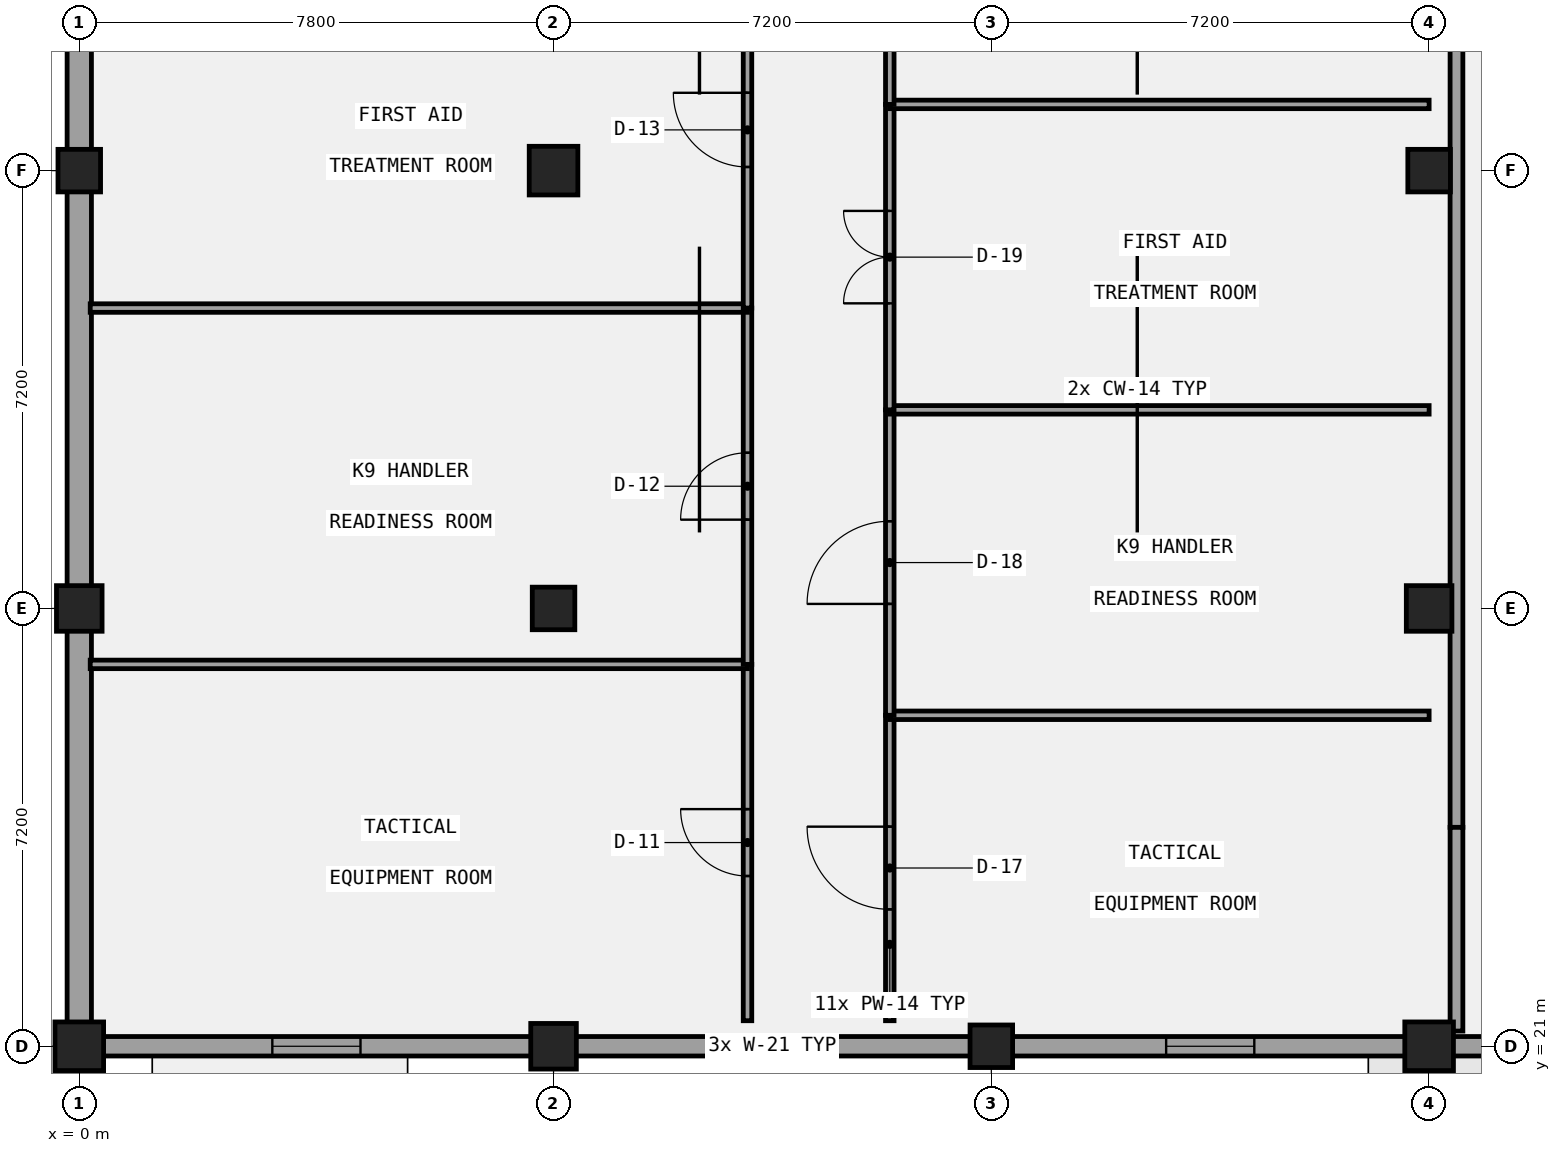
"""IFC4 building model, lengths in metres.
Left out: names, types, materials, properties, quantities, classifications, styles, units other than length and angle.
Written with IfcOpenShell. Run it as: python <this file> out.ifc"""

import sys

from ifc_helpers import new_model, si_unit, direction, frame, frame_2d, origin, origin_2d, place, context, subcontext, project, spatial, rectangle, extrude, element, fill, save


model = new_model("IFC4")
c1 = context("Model", 3, precision=1e-05, world=origin(), true_north=direction((0.0, 1.0)))
c2 = subcontext(c1, "Body", "Model", "MODEL_VIEW")
j1 = project(units=[si_unit("LENGTHUNIT", "METRE"), si_unit("PLANEANGLEUNIT", "RADIAN")], contexts=[c1])
p1 = place(None, origin())
s1 = spatial("IfcSite", under=j1, at=p1, CompositionType="ELEMENT")
p2 = place(p1, origin())
s2 = spatial("IfcBuilding", under=s1, at=p2, CompositionType="ELEMENT")
p3 = place(p2, origin())
s3 = spatial("IfcBuildingStorey", under=s2, at=p3, CompositionType="ELEMENT", Elevation=0.0)
p4 = place(p3, frame((0.0, 21.0, -0.32), z_axis=(0.0, 0.0, 1.0), x_axis=(1.0, 0.0, 0.0)))
e1 = element("IfcColumn", 1, at=p4, inside=s3, PredefinedType="COLUMN", context=c2, shape_type="SweptSolid", body=[
    extrude(rectangle(XDim=0.8, YDim=0.8, at=origin_2d()), origin(), (0.0, 0.0, 1.0), 5.72),
])
p5 = place(p3, frame((0.0, 28.2, -0.32), z_axis=(0.0, 0.0, 1.0), x_axis=(1.0, 0.0, 0.0)))
e2 = element("IfcColumn", 2, at=p5, inside=s3, PredefinedType="COLUMN", context=c2, shape_type="SweptSolid", body=[
    extrude(rectangle(XDim=0.75, YDim=0.75, at=origin_2d()), origin(), (0.0, 0.0, 1.0), 5.72),
])
p6 = place(p3, frame((0.0, 35.4, -0.32), z_axis=(0.0, 0.0, 1.0), x_axis=(1.0, 0.0, 0.0)))
e3 = element("IfcColumn", 3, at=p6, inside=s3, PredefinedType="COLUMN", context=c2, shape_type="SweptSolid", body=[
    extrude(rectangle(XDim=0.7, YDim=0.7, at=origin_2d()), origin(), (0.0, 0.0, 1.0), 5.72),
])
p7 = place(p3, frame((7.8, 21.0, 0.0), z_axis=(0.0, 0.0, 1.0), x_axis=(1.0, 0.0, 0.0)))
e4 = element("IfcColumn", 4, at=p7, inside=s3, PredefinedType="COLUMN", context=c2, shape_type="SweptSolid", body=[
    extrude(rectangle(XDim=0.75, YDim=0.75, at=origin_2d()), origin(), (0.0, 0.0, 1.0), 5.4),
])
p8 = place(p3, frame((7.8, 28.2, 0.0), z_axis=(0.0, 0.0, 1.0), x_axis=(1.0, 0.0, 0.0)))
e5 = element("IfcColumn", 5, at=p8, inside=s3, PredefinedType="COLUMN", context=c2, shape_type="SweptSolid", body=[
    extrude(rectangle(XDim=0.7, YDim=0.7, at=origin_2d()), origin(), (0.0, 0.0, 1.0), 5.4),
])
p9 = place(p3, frame((7.8, 35.4, 0.0), z_axis=(0.0, 0.0, 1.0), x_axis=(1.0, 0.0, 0.0)))
e6 = element("IfcColumn", 6, at=p9, inside=s3, PredefinedType="COLUMN", context=c2, shape_type="SweptSolid", body=[
    extrude(rectangle(XDim=0.8, YDim=0.8, at=origin_2d()), origin(), (0.0, 0.0, 1.0), 5.4),
])
p10 = place(p3, frame((15.0, 21.0, 0.0), z_axis=(0.0, 0.0, 1.0), x_axis=(1.0, 0.0, 0.0)))
e7 = element("IfcColumn", 7, at=p10, inside=s3, PredefinedType="COLUMN", context=c2, shape_type="SweptSolid", body=[
    extrude(rectangle(XDim=0.7, YDim=0.7, at=origin_2d()), origin(), (0.0, 0.0, 1.0), 5.4),
])
p11 = place(p3, frame((22.2, 21.0, 0.0), z_axis=(0.0, 0.0, 1.0), x_axis=(1.0, 0.0, 0.0)))
e8 = element("IfcColumn", 8, at=p11, inside=s3, PredefinedType="COLUMN", context=c2, shape_type="SweptSolid", body=[
    extrude(rectangle(XDim=0.8, YDim=0.8, at=origin_2d()), origin(), (0.0, 0.0, 1.0), 5.4),
])
p12 = place(p3, frame((22.2, 28.2, 0.0), z_axis=(0.0, 0.0, 1.0), x_axis=(1.0, 0.0, 0.0)))
e9 = element("IfcColumn", 9, at=p12, inside=s3, PredefinedType="COLUMN", context=c2, shape_type="SweptSolid", body=[
    extrude(rectangle(XDim=0.75, YDim=0.75, at=origin_2d()), origin(), (0.0, 0.0, 1.0), 5.4),
])
p13 = place(p3, frame((22.2, 35.4, 0.0), z_axis=(0.0, 0.0, 1.0), x_axis=(1.0, 0.0, 0.0)))
e10 = element("IfcColumn", 10, at=p13, inside=s3, PredefinedType="COLUMN", context=c2, shape_type="SweptSolid", body=[
    extrude(rectangle(XDim=0.7, YDim=0.7, at=origin_2d()), origin(), (0.0, 0.0, 1.0), 5.4),
])
p14 = place(p3, frame((0.0, 56.8, 0.0), z_axis=(0.0, 0.0, 1.0), x_axis=(0.0, -1.0, 0.0)))
e11 = element("IfcWall", 11, at=p14, inside=s3, PredefinedType="SOLIDWALL", context=c2, shape_type="SweptSolid", body=[
    extrude(rectangle(XDim=35.6, YDim=0.4, at=frame_2d((17.8, 0.0))), origin(), (0.0, 0.0, 1.0), 4.37),
])
p15 = place(p3, frame((-0.16, 21.0, 0.0), z_axis=(0.0, 0.0, 1.0), x_axis=(1.0, 0.0, 0.0)))
e12 = element("IfcWall", 12, at=p15, inside=s3, PredefinedType="SOLIDWALL", context=c2, shape_type="SweptSolid", body=[
    extrude(rectangle(XDim=29.72, YDim=0.32, at=frame_2d((14.86, 0.0))), origin(), (0.0, 0.0, 1.0), 3.35),
])
p16 = place(p15, frame((23.56, 0.0, 0.0)))
e13 = element("IfcOpeningElement", 13, at=p16, cuts=e12, PredefinedType="OPENING", context=c2, shape_type="SweptSolid", body=[
    extrude(rectangle(XDim=4.8, YDim=3.1, at=frame_2d((2.4, 1.55))), frame((0.0, 0.17, 0.0), z_axis=(0.0, -1.0, 0.0), x_axis=(1.0, 0.0, 0.0)), (0.0, 0.0, 1.0), 0.34),
])
p17 = place(p15, frame((3.335, 0.0, 1.0)))
e14 = element("IfcOpeningElement", 14, at=p17, cuts=e12, PredefinedType="OPENING", context=c2, shape_type="SweptSolid", body=[
    extrude(rectangle(XDim=1.45, YDim=1.4, at=frame_2d((0.725, 0.7))), frame((0.0, 0.17, 0.0), z_axis=(0.0, -1.0, 0.0), x_axis=(1.0, 0.0, 0.0)), (0.0, 0.0, 1.0), 0.34),
])
p18 = place(p15, frame((10.835, 0.0, 1.0)))
e15 = element("IfcOpeningElement", 15, at=p18, cuts=e12, PredefinedType="OPENING", context=c2, shape_type="SweptSolid", body=[
    extrude(rectangle(XDim=1.45, YDim=1.4, at=frame_2d((0.725, 0.7))), frame((0.0, 0.17, 0.0), z_axis=(0.0, -1.0, 0.0), x_axis=(1.0, 0.0, 0.0)), (0.0, 0.0, 1.0), 0.34),
])
p19 = place(p15, frame((18.035, 0.0, 1.0)))
e16 = element("IfcOpeningElement", 16, at=p19, cuts=e12, PredefinedType="OPENING", context=c2, shape_type="SweptSolid", body=[
    extrude(rectangle(XDim=1.45, YDim=1.4, at=frame_2d((0.725, 0.7))), frame((0.0, 0.17, 0.0), z_axis=(0.0, -1.0, 0.0), x_axis=(1.0, 0.0, 0.0)), (0.0, 0.0, 1.0), 0.34),
])
p20 = place(p3, frame((22.65, 24.6, 0.0), z_axis=(0.0, 0.0, 1.0), x_axis=(0.0, 1.0, 0.0)))
e17 = element("IfcWall", 17, at=p20, inside=s3, PredefinedType="PARTITIONING", context=c2, shape_type="SweptSolid", body=[
    extrude(rectangle(XDim=32.0, YDim=0.21, at=frame_2d((16.0, 0.0))), origin(), (0.0, 0.0, 1.0), 4.65),
])
p21 = place(p3, frame((22.65, 21.25, 0.0), z_axis=(0.0, 0.0, 1.0), x_axis=(0.0, 1.0, 0.0)))
e18 = element("IfcWall", 18, at=p21, inside=s3, PredefinedType="PARTITIONING", context=c2, shape_type="SweptSolid", body=[
    extrude(rectangle(XDim=3.35, YDim=0.21, at=frame_2d((1.675, 0.0))), origin(), (0.0, 0.0, 1.0), 4.65),
])
p22 = place(p3, frame((10.99, 21.42, 0.0), z_axis=(0.0, 0.0, 1.0), x_axis=(0.0, 1.0, 0.0)))
e19 = element("IfcWall", 19, at=p22, inside=s3, PredefinedType="PARTITIONING", context=c2, shape_type="SweptSolid", body=[
    extrude(rectangle(XDim=5.86, YDim=0.14, at=frame_2d((2.93, 0.0))), origin(), (0.0, 0.0, 1.0), 5.12),
])
p23 = place(p22, frame((2.38, 0.0, 0.0)))
e20 = element("IfcOpeningElement", 20, at=p23, cuts=e19, PredefinedType="OPENING", context=c2, shape_type="SweptSolid", body=[
    extrude(rectangle(XDim=1.1, YDim=2.22, at=frame_2d((0.55, 1.11))), frame((0.0, 0.08, 0.0), z_axis=(0.0, -1.0, 0.0), x_axis=(1.0, 0.0, 0.0)), (0.0, 0.0, 1.0), 0.16),
])
p24 = place(p3, frame((0.18, 27.28, 0.0), z_axis=(0.0, 0.0, 1.0), x_axis=(1.0, 0.0, 0.0)))
e21 = element("IfcWall", 21, at=p24, inside=s3, PredefinedType="PARTITIONING", context=c2, shape_type="SweptSolid", body=[
    extrude(rectangle(XDim=10.81, YDim=0.14, at=frame_2d((5.405, 0.0))), origin(), (0.0, 0.0, 1.0), 5.12),
])
p25 = place(p3, frame((10.99, 27.28, 0.0), z_axis=(0.0, 0.0, 1.0), x_axis=(0.0, 1.0, 0.0)))
e22 = element("IfcWall", 22, at=p25, inside=s3, PredefinedType="PARTITIONING", context=c2, shape_type="SweptSolid", body=[
    extrude(rectangle(XDim=5.86, YDim=0.14, at=frame_2d((2.93, 0.0))), origin(), (0.0, 0.0, 1.0), 5.12),
])
p26 = place(p25, frame((2.38, 0.0, 0.0)))
e23 = element("IfcOpeningElement", 23, at=p26, cuts=e22, PredefinedType="OPENING", context=c2, shape_type="SweptSolid", body=[
    extrude(rectangle(XDim=1.1, YDim=2.35, at=frame_2d((0.55, 1.175))), frame((0.0, 0.08, 0.0), z_axis=(0.0, -1.0, 0.0), x_axis=(1.0, 0.0, 0.0)), (0.0, 0.0, 1.0), 0.16),
])
p27 = place(p3, frame((0.18, 33.14, 0.0), z_axis=(0.0, 0.0, 1.0), x_axis=(1.0, 0.0, 0.0)))
e24 = element("IfcWall", 24, at=p27, inside=s3, PredefinedType="PARTITIONING", context=c2, shape_type="SweptSolid", body=[
    extrude(rectangle(XDim=10.81, YDim=0.14, at=frame_2d((5.405, 0.0))), origin(), (0.0, 0.0, 1.0), 5.12),
])
p28 = place(p3, frame((10.99, 33.14, 0.0), z_axis=(0.0, 0.0, 1.0), x_axis=(0.0, 1.0, 0.0)))
e25 = element("IfcWall", 25, at=p28, inside=s3, PredefinedType="PARTITIONING", context=c2, shape_type="SweptSolid", body=[
    extrude(rectangle(XDim=5.86, YDim=0.14, at=frame_2d((2.93, 0.0))), origin(), (0.0, 0.0, 1.0), 5.12),
])
p29 = place(p28, frame((2.32, 0.0, 0.0)))
e26 = element("IfcOpeningElement", 26, at=p29, cuts=e25, PredefinedType="OPENING", context=c2, shape_type="SweptSolid", body=[
    extrude(rectangle(XDim=1.22, YDim=2.1, at=frame_2d((0.61, 1.05))), frame((0.0, 0.08, 0.0), z_axis=(0.0, -1.0, 0.0), x_axis=(1.0, 0.0, 0.0)), (0.0, 0.0, 1.0), 0.16),
])
p30 = place(p3, frame((13.33, 21.42, 0.0), z_axis=(0.0, 0.0, 1.0), x_axis=(0.0, 1.0, 0.0)))
e27 = element("IfcWall", 27, at=p30, inside=s3, PredefinedType="PARTITIONING", context=c2, shape_type="SweptSolid", body=[
    extrude(rectangle(XDim=5.023, YDim=0.14, at=frame_2d((2.512, 0.0))), origin(), (0.0, 0.0, 1.0), 5.12),
])
p31 = place(p30, frame((1.832, 0.0, 0.0)))
e28 = element("IfcOpeningElement", 28, at=p31, cuts=e27, PredefinedType="OPENING", context=c2, shape_type="SweptSolid", body=[
    extrude(rectangle(XDim=1.36, YDim=2.22, at=frame_2d((0.68, 1.11))), frame((0.0, 0.08, 0.0), z_axis=(0.0, -1.0, 0.0), x_axis=(1.0, 0.0, 0.0)), (0.0, 0.0, 1.0), 0.16),
])
p32 = place(p3, frame((13.33, 26.443, 0.0), z_axis=(0.0, 0.0, 1.0), x_axis=(1.0, 0.0, 0.0)))
e29 = element("IfcWall", 29, at=p32, inside=s3, PredefinedType="PARTITIONING", context=c2, shape_type="SweptSolid", body=[
    extrude(rectangle(XDim=8.87, YDim=0.14, at=frame_2d((4.435, 0.0))), origin(), (0.0, 0.0, 1.0), 5.12),
])
p33 = place(p3, frame((13.33, 26.443, 0.0), z_axis=(0.0, 0.0, 1.0), x_axis=(0.0, 1.0, 0.0)))
e30 = element("IfcWall", 30, at=p33, inside=s3, PredefinedType="PARTITIONING", context=c2, shape_type="SweptSolid", body=[
    extrude(rectangle(XDim=5.023, YDim=0.14, at=frame_2d((2.511, 0.0))), origin(), (0.0, 0.0, 1.0), 5.12),
])
p34 = place(p33, frame((1.832, 0.0, 0.0)))
e31 = element("IfcOpeningElement", 31, at=p34, cuts=e30, PredefinedType="OPENING", context=c2, shape_type="SweptSolid", body=[
    extrude(rectangle(XDim=1.36, YDim=2.35, at=frame_2d((0.68, 1.175))), frame((0.0, 0.08, 0.0), z_axis=(0.0, -1.0, 0.0), x_axis=(1.0, 0.0, 0.0)), (0.0, 0.0, 1.0), 0.16),
])
p35 = place(p3, frame((13.33, 31.466, 0.0), z_axis=(0.0, 0.0, 1.0), x_axis=(1.0, 0.0, 0.0)))
e32 = element("IfcWall", 32, at=p35, inside=s3, PredefinedType="PARTITIONING", context=c2, shape_type="SweptSolid", body=[
    extrude(rectangle(XDim=8.87, YDim=0.14, at=frame_2d((4.435, 0.0))), origin(), (0.0, 0.0, 1.0), 5.12),
])
p36 = place(p3, frame((13.33, 31.466, 0.0), z_axis=(0.0, 0.0, 1.0), x_axis=(0.0, 1.0, 0.0)))
e33 = element("IfcWall", 33, at=p36, inside=s3, PredefinedType="PARTITIONING", context=c2, shape_type="SweptSolid", body=[
    extrude(rectangle(XDim=5.023, YDim=0.14, at=frame_2d((2.511, 0.0))), origin(), (0.0, 0.0, 1.0), 5.12),
])
p37 = place(p36, frame((1.751, 0.0, 0.0)))
e34 = element("IfcOpeningElement", 34, at=p37, cuts=e33, PredefinedType="OPENING", context=c2, shape_type="SweptSolid", body=[
    extrude(rectangle(XDim=1.52, YDim=2.1, at=frame_2d((0.76, 1.05))), frame((0.0, 0.08, 0.0), z_axis=(0.0, -1.0, 0.0), x_axis=(1.0, 0.0, 0.0)), (0.0, 0.0, 1.0), 0.16),
])
p38 = place(p3, frame((13.33, 36.489, 0.0), z_axis=(0.0, 0.0, 1.0), x_axis=(1.0, 0.0, 0.0)))
e35 = element("IfcWall", 35, at=p38, inside=s3, PredefinedType="PARTITIONING", context=c2, shape_type="SweptSolid", body=[
    extrude(rectangle(XDim=8.87, YDim=0.14, at=frame_2d((4.435, 0.0))), origin(), (0.0, 0.0, 1.0), 5.12),
])
p39 = place(p3, frame((13.33, 36.489, 0.0), z_axis=(0.0, 0.0, 1.0), x_axis=(0.0, 1.0, 0.0)))
e36 = element("IfcWall", 36, at=p39, inside=s3, PredefinedType="PARTITIONING", context=c2, shape_type="SweptSolid", body=[
    extrude(rectangle(XDim=5.022, YDim=0.14, at=frame_2d((2.511, 0.0))), origin(), (0.0, 0.0, 1.0), 5.12),
])
p40 = place(p39, frame((1.751, 0.0, 0.0)))
e37 = element("IfcOpeningElement", 37, at=p40, cuts=e36, PredefinedType="OPENING", context=c2, shape_type="SweptSolid", body=[
    extrude(rectangle(XDim=1.52, YDim=2.22, at=frame_2d((0.76, 1.11))), frame((0.0, 0.08, 0.0), z_axis=(0.0, -1.0, 0.0), x_axis=(1.0, 0.0, 0.0)), (0.0, 0.0, 1.0), 0.16),
])
p41 = place(p17, origin())
e38 = element("IfcWindow", 38, at=p41, inside=s3, PartitioningType="SINGLE_PANEL", PredefinedType="WINDOW", context=c2, shape_type="SweptSolid", body=[
    extrude(rectangle(XDim=1.45, YDim=1.4, at=frame_2d((0.725, 0.7))), frame((0.0, 0.03, 0.0), z_axis=(0.0, -1.0, 0.0), x_axis=(1.0, 0.0, 0.0)), (0.0, 0.0, 1.0), 0.06),
])
fill(e14, e38)
p42 = place(p18, origin())
e39 = element("IfcWindow", 39, at=p42, inside=s3, PartitioningType="SINGLE_PANEL", PredefinedType="WINDOW", context=c2, shape_type="SweptSolid", body=[
    extrude(rectangle(XDim=1.45, YDim=1.4, at=frame_2d((0.725, 0.7))), frame((0.0, 0.03, 0.0), z_axis=(0.0, -1.0, 0.0), x_axis=(1.0, 0.0, 0.0)), (0.0, 0.0, 1.0), 0.06),
])
fill(e15, e39)
p43 = place(p19, origin())
e40 = element("IfcWindow", 40, at=p43, inside=s3, PartitioningType="SINGLE_PANEL", PredefinedType="WINDOW", context=c2, shape_type="SweptSolid", body=[
    extrude(rectangle(XDim=1.45, YDim=1.4, at=frame_2d((0.725, 0.7))), frame((0.0, 0.03, 0.0), z_axis=(0.0, -1.0, 0.0), x_axis=(1.0, 0.0, 0.0)), (0.0, 0.0, 1.0), 0.06),
])
fill(e16, e40)
p44 = place(p23, frame((1.1, 0.0, 0.0), z_axis=(0.0, 0.0, 1.0), x_axis=(-1.0, 0.0, 0.0)))
e41 = element("IfcDoor", 41, at=p44, inside=s3, OperationType="SINGLE_SWING_RIGHT", PredefinedType="DOOR", context=c2, shape_type="SweptSolid", body=[
    extrude(rectangle(XDim=1.1, YDim=2.22, at=frame_2d((0.55, 1.11))), frame((0.0, 0.025, 0.0), z_axis=(0.0, -1.0, 0.0), x_axis=(1.0, 0.0, 0.0)), (0.0, 0.0, 1.0), 0.05),
])
fill(e20, e41)
p45 = place(p26, frame((1.1, 0.0, 0.0), z_axis=(0.0, 0.0, 1.0), x_axis=(-1.0, 0.0, 0.0)))
e42 = element("IfcDoor", 42, at=p45, inside=s3, OperationType="SINGLE_SWING_LEFT", PredefinedType="DOOR", context=c2, shape_type="SweptSolid", body=[
    extrude(rectangle(XDim=1.1, YDim=2.35, at=frame_2d((0.55, 1.175))), frame((0.0, 0.025, 0.0), z_axis=(0.0, -1.0, 0.0), x_axis=(1.0, 0.0, 0.0)), (0.0, 0.0, 1.0), 0.05),
])
fill(e23, e42)
p46 = place(p29, frame((1.22, 0.0, 0.0), z_axis=(0.0, 0.0, 1.0), x_axis=(-1.0, 0.0, 0.0)))
e43 = element("IfcDoor", 43, at=p46, inside=s3, OperationType="SINGLE_SWING_RIGHT", PredefinedType="DOOR", context=c2, shape_type="SweptSolid", body=[
    extrude(rectangle(XDim=1.22, YDim=2.1, at=frame_2d((0.61, 1.05))), frame((0.0, 0.025, 0.0), z_axis=(0.0, -1.0, 0.0), x_axis=(1.0, 0.0, 0.0)), (0.0, 0.0, 1.0), 0.05),
])
fill(e26, e43)
p47 = place(p31, origin())
e44 = element("IfcDoor", 44, at=p47, inside=s3, OperationType="SINGLE_SWING_RIGHT", PredefinedType="DOOR", context=c2, shape_type="SweptSolid", body=[
    extrude(rectangle(XDim=1.36, YDim=2.22, at=frame_2d((0.68, 1.11))), frame((0.0, 0.025, 0.0), z_axis=(0.0, -1.0, 0.0), x_axis=(1.0, 0.0, 0.0)), (0.0, 0.0, 1.0), 0.05),
])
fill(e28, e44)
p48 = place(p34, origin())
e45 = element("IfcDoor", 45, at=p48, inside=s3, OperationType="SINGLE_SWING_LEFT", PredefinedType="DOOR", context=c2, shape_type="SweptSolid", body=[
    extrude(rectangle(XDim=1.36, YDim=2.35, at=frame_2d((0.68, 1.175))), frame((0.0, 0.025, 0.0), z_axis=(0.0, -1.0, 0.0), x_axis=(1.0, 0.0, 0.0)), (0.0, 0.0, 1.0), 0.05),
])
fill(e31, e45)
p49 = place(p37, origin())
e46 = element("IfcDoor", 46, at=p49, inside=s3, OperationType="DOUBLE_DOOR_SINGLE_SWING", PredefinedType="DOOR", context=c2, shape_type="SweptSolid", body=[
    extrude(rectangle(XDim=1.52, YDim=2.1, at=frame_2d((0.76, 1.05))), frame((0.0, 0.025, 0.0), z_axis=(0.0, -1.0, 0.0), x_axis=(1.0, 0.0, 0.0)), (0.0, 0.0, 1.0), 0.05),
])
fill(e34, e46)
save(model, sys.argv[1])
